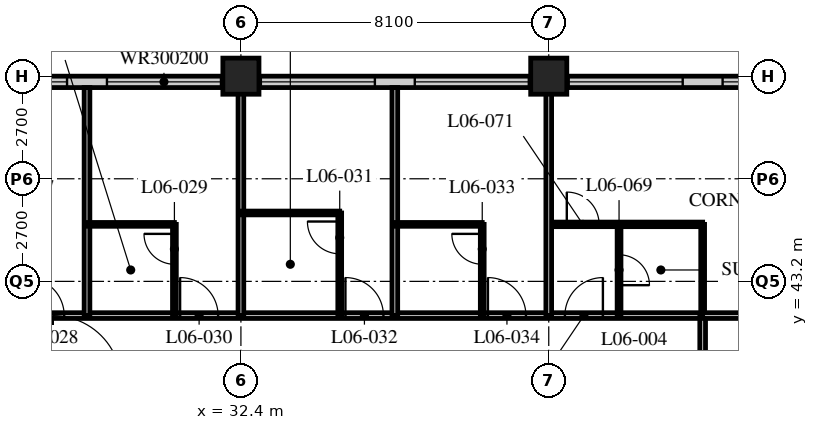
"""IFC4 building model, lengths in metres.
Left out: names, types, materials, properties, quantities, classifications, styles, units other than length and angle.
Written with IfcOpenShell. Run it as: python <this file> out.ifc"""

import sys

from ifc_helpers import new_model, si_unit, direction, frame, frame_2d, origin, origin_2d, place, context, subcontext, project, spatial, rectangle, hollow_rectangle, extrude, element, fill, save


model = new_model("IFC4")
c1 = context("Model", 3, precision=1e-05, world=origin(), true_north=direction((0.0, 1.0)))
c2 = subcontext(c1, "Body", "Model", "MODEL_VIEW")
j1 = project(units=[si_unit("LENGTHUNIT", "METRE"), si_unit("PLANEANGLEUNIT", "RADIAN")], contexts=[c1])
p1 = place(None, origin())
s1 = spatial("IfcSite", under=j1, at=p1, CompositionType="ELEMENT")
p2 = place(p1, origin())
s2 = spatial("IfcBuilding", under=s1, at=p2, CompositionType="ELEMENT")
p3 = place(p2, frame((0.0, 0.0, 33.0)))
s3 = spatial("IfcBuildingStorey", under=s2, at=p3, CompositionType="ELEMENT", Elevation=33.0)
for number, where, z_axis, x_axis in (
    (1, (32.4, 48.6, 0.0), (0.0, 0.0, 1.0), (1.0, 0.0, 0.0)),
    (2, (40.5, 48.6, 0.0), (0.0, 0.0, 1.0), (1.0, 0.0, 0.0)),
):
    element("IfcColumn", number, at=place(p3, frame(where, z_axis=z_axis, x_axis=x_axis)), inside=s3, PredefinedType="COLUMN", context=c2, shape_type="SweptSolid", body=[
        extrude(hollow_rectangle(XDim=0.95, YDim=0.95, WallThickness=0.095, at=origin_2d()), origin(), (0.0, 0.0, 1.0), 3.4),
    ])
p4 = place(p3, frame((48.3, 48.45, 0.0), z_axis=(0.0, 0.0, 1.0), x_axis=(-1.0, 0.0, 0.0)))
e3 = element("IfcWall", 3, at=p4, inside=s3, PredefinedType="SOLIDWALL", context=c2, shape_type="SweptSolid", body=[
    extrude(rectangle(XDim=40.2, YDim=0.3, at=frame_2d((20.1, 0.0))), origin(), (0.0, 0.0, 1.0), 3.19),
])
p5 = place(p4, frame((0.225, 0.0, 0.9)))
e4 = element("IfcOpeningElement", 4, at=p5, cuts=e3, PredefinedType="OPENING", context=c2, shape_type="SweptSolid", body=[
    extrude(rectangle(XDim=3.0, YDim=2.0, at=frame_2d((1.5, 1.0))), frame((0.0, 0.16, 0.0), z_axis=(0.0, -1.0, 0.0), x_axis=(1.0, 0.0, 0.0)), (0.0, 0.0, 1.0), 0.32),
])
p6 = place(p4, frame((4.275, 0.0, 0.9)))
e5 = element("IfcOpeningElement", 5, at=p6, cuts=e3, PredefinedType="OPENING", context=c2, shape_type="SweptSolid", body=[
    extrude(rectangle(XDim=3.0, YDim=2.0, at=frame_2d((1.5, 1.0))), frame((0.0, 0.16, 0.0), z_axis=(0.0, -1.0, 0.0), x_axis=(1.0, 0.0, 0.0)), (0.0, 0.0, 1.0), 0.32),
])
p7 = place(p4, frame((8.325, 0.0, 0.9)))
e6 = element("IfcOpeningElement", 6, at=p7, cuts=e3, PredefinedType="OPENING", context=c2, shape_type="SweptSolid", body=[
    extrude(rectangle(XDim=3.0, YDim=2.0, at=frame_2d((1.5, 1.0))), frame((0.0, 0.16, 0.0), z_axis=(0.0, -1.0, 0.0), x_axis=(1.0, 0.0, 0.0)), (0.0, 0.0, 1.0), 0.32),
])
p8 = place(p4, frame((12.375, 0.0, 0.9)))
e7 = element("IfcOpeningElement", 7, at=p8, cuts=e3, PredefinedType="OPENING", context=c2, shape_type="SweptSolid", body=[
    extrude(rectangle(XDim=3.0, YDim=2.0, at=frame_2d((1.5, 1.0))), frame((0.0, 0.16, 0.0), z_axis=(0.0, -1.0, 0.0), x_axis=(1.0, 0.0, 0.0)), (0.0, 0.0, 1.0), 0.32),
])
p9 = place(p4, frame((16.425, 0.0, 0.9)))
e8 = element("IfcOpeningElement", 8, at=p9, cuts=e3, PredefinedType="OPENING", context=c2, shape_type="SweptSolid", body=[
    extrude(rectangle(XDim=3.0, YDim=2.0, at=frame_2d((1.5, 1.0))), frame((0.0, 0.16, 0.0), z_axis=(0.0, -1.0, 0.0), x_axis=(1.0, 0.0, 0.0)), (0.0, 0.0, 1.0), 0.32),
])
p10 = place(p4, frame((20.475, 0.0, 0.9)))
e9 = element("IfcOpeningElement", 9, at=p10, cuts=e3, PredefinedType="OPENING", context=c2, shape_type="SweptSolid", body=[
    extrude(rectangle(XDim=3.0, YDim=2.0, at=frame_2d((1.5, 1.0))), frame((0.0, 0.16, 0.0), z_axis=(0.0, -1.0, 0.0), x_axis=(1.0, 0.0, 0.0)), (0.0, 0.0, 1.0), 0.32),
])
p11 = place(p4, frame((24.525, 0.0, 0.9)))
e10 = element("IfcOpeningElement", 10, at=p11, cuts=e3, PredefinedType="OPENING", context=c2, shape_type="SweptSolid", body=[
    extrude(rectangle(XDim=3.0, YDim=2.0, at=frame_2d((1.5, 1.0))), frame((0.0, 0.16, 0.0), z_axis=(0.0, -1.0, 0.0), x_axis=(1.0, 0.0, 0.0)), (0.0, 0.0, 1.0), 0.32),
])
p12 = place(p4, frame((28.575, 0.0, 0.9)))
e11 = element("IfcOpeningElement", 11, at=p12, cuts=e3, PredefinedType="OPENING", context=c2, shape_type="SweptSolid", body=[
    extrude(rectangle(XDim=3.0, YDim=2.0, at=frame_2d((1.5, 1.0))), frame((0.0, 0.16, 0.0), z_axis=(0.0, -1.0, 0.0), x_axis=(1.0, 0.0, 0.0)), (0.0, 0.0, 1.0), 0.32),
])
p13 = place(p4, frame((32.625, 0.0, 0.9)))
e12 = element("IfcOpeningElement", 12, at=p13, cuts=e3, PredefinedType="OPENING", context=c2, shape_type="SweptSolid", body=[
    extrude(rectangle(XDim=3.0, YDim=2.0, at=frame_2d((1.5, 1.0))), frame((0.0, 0.16, 0.0), z_axis=(0.0, -1.0, 0.0), x_axis=(1.0, 0.0, 0.0)), (0.0, 0.0, 1.0), 0.32),
])
p14 = place(p4, frame((36.675, 0.0, 0.9)))
e13 = element("IfcOpeningElement", 13, at=p14, cuts=e3, PredefinedType="OPENING", context=c2, shape_type="SweptSolid", body=[
    extrude(rectangle(XDim=3.0, YDim=2.0, at=frame_2d((1.5, 1.0))), frame((0.0, 0.16, 0.0), z_axis=(0.0, -1.0, 0.0), x_axis=(1.0, 0.0, 0.0)), (0.0, 0.0, 1.0), 0.32),
])
p15 = place(p3, frame((12.15, 42.3, 0.0), z_axis=(0.0, 0.0, 1.0), x_axis=(1.0, 0.0, 0.0)))
e14 = element("IfcWall", 14, at=p15, inside=s3, PredefinedType="PARTITIONING", context=c2, shape_type="SweptSolid", body=[
    extrude(rectangle(XDim=32.4, YDim=0.15, at=frame_2d((16.2, 0.0))), origin(), (0.0, 0.0, 1.0), 3.19),
])
p16 = place(p15, frame((6.5, 0.0, 0.0)))
e15 = element("IfcOpeningElement", 15, at=p16, cuts=e14, PredefinedType="OPENING", context=c2, shape_type="SweptSolid", body=[
    extrude(rectangle(XDim=1.0, YDim=2.1, at=frame_2d((0.5, 1.05))), frame((0.0, 0.085, 0.0), z_axis=(0.0, -1.0, 0.0), x_axis=(1.0, 0.0, 0.0)), (0.0, 0.0, 1.0), 0.17),
])
p17 = place(p15, frame((8.4, 0.0, 0.0)))
e16 = element("IfcOpeningElement", 16, at=p17, cuts=e14, PredefinedType="OPENING", context=c2, shape_type="SweptSolid", body=[
    extrude(rectangle(XDim=1.0, YDim=2.1, at=frame_2d((0.5, 1.05))), frame((0.0, 0.085, 0.0), z_axis=(0.0, -1.0, 0.0), x_axis=(1.0, 0.0, 0.0)), (0.0, 0.0, 1.0), 0.17),
])
p18 = place(p15, frame((14.6, 0.0, 0.0)))
e17 = element("IfcOpeningElement", 17, at=p18, cuts=e14, PredefinedType="OPENING", context=c2, shape_type="SweptSolid", body=[
    extrude(rectangle(XDim=1.0, YDim=2.1, at=frame_2d((0.5, 1.05))), frame((0.0, 0.085, 0.0), z_axis=(0.0, -1.0, 0.0), x_axis=(1.0, 0.0, 0.0)), (0.0, 0.0, 1.0), 0.17),
])
p19 = place(p15, frame((18.65, 0.0, 0.0)))
e18 = element("IfcOpeningElement", 18, at=p19, cuts=e14, PredefinedType="OPENING", context=c2, shape_type="SweptSolid", body=[
    extrude(rectangle(XDim=1.0, YDim=2.1, at=frame_2d((0.5, 1.05))), frame((0.0, 0.085, 0.0), z_axis=(0.0, -1.0, 0.0), x_axis=(1.0, 0.0, 0.0)), (0.0, 0.0, 1.0), 0.17),
])
p20 = place(p15, frame((23.0, 0.0, 0.0)))
e19 = element("IfcOpeningElement", 19, at=p20, cuts=e14, PredefinedType="OPENING", context=c2, shape_type="SweptSolid", body=[
    extrude(rectangle(XDim=1.0, YDim=2.1, at=frame_2d((0.5, 1.05))), frame((0.0, 0.085, 0.0), z_axis=(0.0, -1.0, 0.0), x_axis=(1.0, 0.0, 0.0)), (0.0, 0.0, 1.0), 0.17),
])
p21 = place(p15, frame((26.75, 0.0, 0.0)))
e20 = element("IfcOpeningElement", 20, at=p21, cuts=e14, PredefinedType="OPENING", context=c2, shape_type="SweptSolid", body=[
    extrude(rectangle(XDim=1.0, YDim=2.1, at=frame_2d((0.5, 1.05))), frame((0.0, 0.085, 0.0), z_axis=(0.0, -1.0, 0.0), x_axis=(1.0, 0.0, 0.0)), (0.0, 0.0, 1.0), 0.17),
])
p22 = place(p15, frame((28.775, 0.0, 0.0)))
e21 = element("IfcOpeningElement", 21, at=p22, cuts=e14, PredefinedType="OPENING", context=c2, shape_type="SweptSolid", body=[
    extrude(rectangle(XDim=1.0, YDim=2.1, at=frame_2d((0.5, 1.05))), frame((0.0, 0.085, 0.0), z_axis=(0.0, -1.0, 0.0), x_axis=(1.0, 0.0, 0.0)), (0.0, 0.0, 1.0), 0.17),
])
p23 = place(p15, frame((2.625, 0.0, 0.0)))
e22 = element("IfcOpeningElement", 22, at=p23, cuts=e14, PredefinedType="OPENING", context=c2, shape_type="SweptSolid", body=[
    extrude(rectangle(XDim=1.0, YDim=2.1, at=frame_2d((0.5, 1.05))), frame((0.0, 0.085, 0.0), z_axis=(0.0, -1.0, 0.0), x_axis=(1.0, 0.0, 0.0)), (0.0, 0.0, 1.0), 0.17),
])
p24 = place(p3, frame((44.55, 16.2, 0.0), z_axis=(0.0, 0.0, 1.0), x_axis=(0.0, 1.0, 0.0)))
e23 = element("IfcWall", 23, at=p24, inside=s3, PredefinedType="PARTITIONING", context=c2, shape_type="SweptSolid", body=[
    extrude(rectangle(XDim=26.1, YDim=0.15, at=frame_2d((13.05, 0.0))), origin(), (0.0, 0.0, 1.0), 3.19),
])
p25 = place(p24, frame((2.75, 0.0, 0.0)))
e24 = element("IfcOpeningElement", 24, at=p25, cuts=e23, PredefinedType="OPENING", context=c2, shape_type="SweptSolid", body=[
    extrude(rectangle(XDim=1.0, YDim=2.1, at=frame_2d((0.5, 1.05))), frame((0.0, 0.085, 0.0), z_axis=(0.0, -1.0, 0.0), x_axis=(1.0, 0.0, 0.0)), (0.0, 0.0, 1.0), 0.17),
])
p26 = place(p24, frame((4.35, 0.0, 0.0)))
e25 = element("IfcOpeningElement", 25, at=p26, cuts=e23, PredefinedType="OPENING", context=c2, shape_type="SweptSolid", body=[
    extrude(rectangle(XDim=1.0, YDim=2.1, at=frame_2d((0.5, 1.05))), frame((0.0, 0.085, 0.0), z_axis=(0.0, -1.0, 0.0), x_axis=(1.0, 0.0, 0.0)), (0.0, 0.0, 1.0), 0.17),
])
p27 = place(p24, frame((8.4, 0.0, 0.0)))
e26 = element("IfcOpeningElement", 26, at=p27, cuts=e23, PredefinedType="OPENING", context=c2, shape_type="SweptSolid", body=[
    extrude(rectangle(XDim=1.0, YDim=2.1, at=frame_2d((0.5, 1.05))), frame((0.0, 0.085, 0.0), z_axis=(0.0, -1.0, 0.0), x_axis=(1.0, 0.0, 0.0)), (0.0, 0.0, 1.0), 0.17),
])
p28 = place(p24, frame((14.6, 0.0, 0.0)))
e27 = element("IfcOpeningElement", 27, at=p28, cuts=e23, PredefinedType="OPENING", context=c2, shape_type="SweptSolid", body=[
    extrude(rectangle(XDim=1.0, YDim=2.1, at=frame_2d((0.5, 1.05))), frame((0.0, 0.085, 0.0), z_axis=(0.0, -1.0, 0.0), x_axis=(1.0, 0.0, 0.0)), (0.0, 0.0, 1.0), 0.17),
])
p29 = place(p24, frame((18.65, 0.0, 0.0)))
e28 = element("IfcOpeningElement", 28, at=p29, cuts=e23, PredefinedType="OPENING", context=c2, shape_type="SweptSolid", body=[
    extrude(rectangle(XDim=1.0, YDim=2.1, at=frame_2d((0.5, 1.05))), frame((0.0, 0.085, 0.0), z_axis=(0.0, -1.0, 0.0), x_axis=(1.0, 0.0, 0.0)), (0.0, 0.0, 1.0), 0.17),
])
p30 = place(p24, frame((22.65, 0.0, 0.0)))
e29 = element("IfcOpeningElement", 29, at=p30, cuts=e23, PredefinedType="OPENING", context=c2, shape_type="SweptSolid", body=[
    extrude(rectangle(XDim=1.0, YDim=2.1, at=frame_2d((0.5, 1.05))), frame((0.0, 0.085, 0.0), z_axis=(0.0, -1.0, 0.0), x_axis=(1.0, 0.0, 0.0)), (0.0, 0.0, 1.0), 0.17),
])
p31 = place(p3, frame((28.35, 42.3, 0.0), z_axis=(0.0, 0.0, 1.0), x_axis=(0.0, 1.0, 0.0)))
e30 = element("IfcWall", 30, at=p31, inside=s3, PredefinedType="PARTITIONING", context=c2, shape_type="SweptSolid", body=[
    extrude(rectangle(XDim=6.0, YDim=0.15, at=frame_2d((3.0, 0.0))), origin(), (0.0, 0.0, 1.0), 3.19),
])
p32 = place(p3, frame((28.35, 44.7, 0.0), z_axis=(0.0, 0.0, 1.0), x_axis=(1.0, 0.0, 0.0)))
e31 = element("IfcWall", 31, at=p32, inside=s3, PredefinedType="PARTITIONING", context=c2, shape_type="SweptSolid", body=[
    extrude(rectangle(XDim=2.3, YDim=0.1, at=frame_2d((1.15, 0.0))), origin(), (0.0, 0.0, 1.0), 3.19),
])
p33 = place(p3, frame((30.65, 42.3, 0.0), z_axis=(0.0, 0.0, 1.0), x_axis=(0.0, 1.0, 0.0)))
e32 = element("IfcWall", 32, at=p33, inside=s3, PredefinedType="PARTITIONING", context=c2, shape_type="SweptSolid", body=[
    extrude(rectangle(XDim=2.4, YDim=0.1, at=frame_2d((1.2, 0.0))), origin(), (0.0, 0.0, 1.0), 3.19),
])
p34 = place(p33, frame((1.35, 0.0, 0.0)))
e33 = element("IfcOpeningElement", 33, at=p34, cuts=e32, PredefinedType="OPENING", context=c2, shape_type="SweptSolid", body=[
    extrude(rectangle(XDim=0.8, YDim=2.1, at=frame_2d((0.4, 1.05))), frame((0.0, 0.06, 0.0), z_axis=(0.0, -1.0, 0.0), x_axis=(1.0, 0.0, 0.0)), (0.0, 0.0, 1.0), 0.12),
])
p35 = place(p3, frame((32.4, 42.3, 0.0), z_axis=(0.0, 0.0, 1.0), x_axis=(0.0, 1.0, 0.0)))
e34 = element("IfcWall", 34, at=p35, inside=s3, PredefinedType="PARTITIONING", context=c2, shape_type="SweptSolid", body=[
    extrude(rectangle(XDim=6.0, YDim=0.15, at=frame_2d((3.0, 0.0))), origin(), (0.0, 0.0, 1.0), 2.578),
])
p36 = place(p3, frame((32.4, 45.0, 0.0), z_axis=(0.0, 0.0, 1.0), x_axis=(1.0, 0.0, 0.0)))
e35 = element("IfcWall", 35, at=p36, inside=s3, PredefinedType="PARTITIONING", context=c2, shape_type="SweptSolid", body=[
    extrude(rectangle(XDim=2.6, YDim=0.1, at=frame_2d((1.3, 0.0))), origin(), (0.0, 0.0, 1.0), 3.19),
])
p37 = place(p3, frame((35.0, 42.3, 0.0), z_axis=(0.0, 0.0, 1.0), x_axis=(0.0, 1.0, 0.0)))
e36 = element("IfcWall", 36, at=p37, inside=s3, PredefinedType="PARTITIONING", context=c2, shape_type="SweptSolid", body=[
    extrude(rectangle(XDim=2.7, YDim=0.1, at=frame_2d((1.35, 0.0))), origin(), (0.0, 0.0, 1.0), 3.19),
])
p38 = place(p37, frame((1.625, 0.0, 0.0)))
e37 = element("IfcOpeningElement", 37, at=p38, cuts=e36, PredefinedType="OPENING", context=c2, shape_type="SweptSolid", body=[
    extrude(rectangle(XDim=0.85, YDim=2.1, at=frame_2d((0.425, 1.05))), frame((0.0, 0.06, 0.0), z_axis=(0.0, -1.0, 0.0), x_axis=(1.0, 0.0, 0.0)), (0.0, 0.0, 1.0), 0.12),
])
p39 = place(p3, frame((36.45, 42.3, 0.0), z_axis=(0.0, 0.0, 1.0), x_axis=(0.0, 1.0, 0.0)))
e38 = element("IfcWall", 38, at=p39, inside=s3, PredefinedType="PARTITIONING", context=c2, shape_type="SweptSolid", body=[
    extrude(rectangle(XDim=6.0, YDim=0.15, at=frame_2d((3.0, 0.0))), origin(), (0.0, 0.0, 1.0), 3.19),
])
p40 = place(p3, frame((36.45, 44.7, 0.0), z_axis=(0.0, 0.0, 1.0), x_axis=(1.0, 0.0, 0.0)))
e39 = element("IfcWall", 39, at=p40, inside=s3, PredefinedType="PARTITIONING", context=c2, shape_type="SweptSolid", body=[
    extrude(rectangle(XDim=2.3, YDim=0.1, at=frame_2d((1.15, 0.0))), origin(), (0.0, 0.0, 1.0), 3.19),
])
p41 = place(p3, frame((38.75, 42.3, 0.0), z_axis=(0.0, 0.0, 1.0), x_axis=(0.0, 1.0, 0.0)))
e40 = element("IfcWall", 40, at=p41, inside=s3, PredefinedType="PARTITIONING", context=c2, shape_type="SweptSolid", body=[
    extrude(rectangle(XDim=2.4, YDim=0.1, at=frame_2d((1.2, 0.0))), origin(), (0.0, 0.0, 1.0), 3.19),
])
p42 = place(p41, frame((1.35, 0.0, 0.0)))
e41 = element("IfcOpeningElement", 41, at=p42, cuts=e40, PredefinedType="OPENING", context=c2, shape_type="SweptSolid", body=[
    extrude(rectangle(XDim=0.8, YDim=2.1, at=frame_2d((0.4, 1.05))), frame((0.0, 0.06, 0.0), z_axis=(0.0, -1.0, 0.0), x_axis=(1.0, 0.0, 0.0)), (0.0, 0.0, 1.0), 0.12),
])
p43 = place(p3, frame((40.5, 44.7, 0.0), z_axis=(0.0, 0.0, 1.0), x_axis=(1.0, 0.0, 0.0)))
e42 = element("IfcWall", 42, at=p43, inside=s3, PredefinedType="PARTITIONING", context=c2, shape_type="SweptSolid", body=[
    extrude(rectangle(XDim=4.05, YDim=0.12, at=frame_2d((2.025, 0.0))), origin(), (0.0, 0.0, 1.0), 3.19),
])
p44 = place(p43, frame((0.475, 0.0, 0.0)))
e43 = element("IfcOpeningElement", 43, at=p44, cuts=e42, PredefinedType="OPENING", context=c2, shape_type="SweptSolid", body=[
    extrude(rectangle(XDim=0.85, YDim=2.1, at=frame_2d((0.425, 1.05))), frame((0.0, 0.07, 0.0), z_axis=(0.0, -1.0, 0.0), x_axis=(1.0, 0.0, 0.0)), (0.0, 0.0, 1.0), 0.14),
])
p45 = place(p3, frame((42.35, 42.3, 0.0), z_axis=(0.0, 0.0, 1.0), x_axis=(0.0, 1.0, 0.0)))
e44 = element("IfcWall", 44, at=p45, inside=s3, PredefinedType="PARTITIONING", context=c2, shape_type="SweptSolid", body=[
    extrude(rectangle(XDim=2.4, YDim=0.1, at=frame_2d((1.2, 0.0))), origin(), (0.0, 0.0, 1.0), 3.19),
])
p46 = place(p45, frame((0.8, 0.0, 0.0)))
e45 = element("IfcOpeningElement", 45, at=p46, cuts=e44, PredefinedType="OPENING", context=c2, shape_type="SweptSolid", body=[
    extrude(rectangle(XDim=0.8, YDim=2.1, at=frame_2d((0.4, 1.05))), frame((0.0, 0.06, 0.0), z_axis=(0.0, -1.0, 0.0), x_axis=(1.0, 0.0, 0.0)), (0.0, 0.0, 1.0), 0.12),
])
p47 = place(p3, frame((44.55, 42.3, 0.0), z_axis=(0.0, 0.0, 1.0), x_axis=(0.0, 1.0, 0.0)))
e46 = element("IfcWall", 46, at=p47, inside=s3, PredefinedType="PARTITIONING", context=c2, shape_type="SweptSolid", body=[
    extrude(rectangle(XDim=2.4, YDim=0.1, at=frame_2d((1.2, 0.0))), origin(), (0.0, 0.0, 1.0), 3.19),
])
p48 = place(p3, frame((44.55, 42.3, 0.0), z_axis=(0.0, 0.0, 1.0), x_axis=(1.0, 0.0, 0.0)))
e47 = element("IfcWall", 47, at=p48, inside=s3, PredefinedType="PARTITIONING", context=c2, shape_type="SweptSolid", body=[
    extrude(rectangle(XDim=7.8, YDim=0.15, at=frame_2d((3.9, 0.0))), origin(), (0.0, 0.0, 1.0), 3.19),
])
p49 = place(p3, frame((40.5, 42.3, 0.0), z_axis=(0.0, 0.0, 1.0), x_axis=(0.0, 1.0, 0.0)))
e48 = element("IfcWall", 48, at=p49, inside=s3, PredefinedType="PARTITIONING", context=c2, shape_type="SweptSolid", body=[
    extrude(rectangle(XDim=6.0, YDim=0.15, at=frame_2d((3.0, 0.0))), origin(), (0.0, 0.0, 1.0), 2.578),
])
p50 = place(p5, origin())
e49 = element("IfcWindow", 49, at=p50, inside=s3, PartitioningType="SINGLE_PANEL", PredefinedType="WINDOW", context=c2, shape_type="SweptSolid", body=[
    extrude(rectangle(XDim=3.0, YDim=2.0, at=frame_2d((1.5, 1.0))), frame((0.0, 0.03, 0.0), z_axis=(0.0, -1.0, 0.0), x_axis=(1.0, 0.0, 0.0)), (0.0, 0.0, 1.0), 0.06),
])
fill(e4, e49)
p51 = place(p6, origin())
e50 = element("IfcWindow", 50, at=p51, inside=s3, PartitioningType="SINGLE_PANEL", PredefinedType="WINDOW", context=c2, shape_type="SweptSolid", body=[
    extrude(rectangle(XDim=3.0, YDim=2.0, at=frame_2d((1.5, 1.0))), frame((0.0, 0.03, 0.0), z_axis=(0.0, -1.0, 0.0), x_axis=(1.0, 0.0, 0.0)), (0.0, 0.0, 1.0), 0.06),
])
fill(e5, e50)
p52 = place(p7, origin())
e51 = element("IfcWindow", 51, at=p52, inside=s3, PartitioningType="SINGLE_PANEL", PredefinedType="WINDOW", context=c2, shape_type="SweptSolid", body=[
    extrude(rectangle(XDim=3.0, YDim=2.0, at=frame_2d((1.5, 1.0))), frame((0.0, 0.03, 0.0), z_axis=(0.0, -1.0, 0.0), x_axis=(1.0, 0.0, 0.0)), (0.0, 0.0, 1.0), 0.06),
])
fill(e6, e51)
p53 = place(p8, origin())
e52 = element("IfcWindow", 52, at=p53, inside=s3, PartitioningType="SINGLE_PANEL", PredefinedType="WINDOW", context=c2, shape_type="SweptSolid", body=[
    extrude(rectangle(XDim=3.0, YDim=2.0, at=frame_2d((1.5, 1.0))), frame((0.0, 0.03, 0.0), z_axis=(0.0, -1.0, 0.0), x_axis=(1.0, 0.0, 0.0)), (0.0, 0.0, 1.0), 0.06),
])
fill(e7, e52)
p54 = place(p9, origin())
e53 = element("IfcWindow", 53, at=p54, inside=s3, PartitioningType="SINGLE_PANEL", PredefinedType="WINDOW", context=c2, shape_type="SweptSolid", body=[
    extrude(rectangle(XDim=3.0, YDim=2.0, at=frame_2d((1.5, 1.0))), frame((0.0, 0.03, 0.0), z_axis=(0.0, -1.0, 0.0), x_axis=(1.0, 0.0, 0.0)), (0.0, 0.0, 1.0), 0.06),
])
fill(e8, e53)
p55 = place(p10, origin())
e54 = element("IfcWindow", 54, at=p55, inside=s3, PartitioningType="SINGLE_PANEL", PredefinedType="WINDOW", context=c2, shape_type="SweptSolid", body=[
    extrude(rectangle(XDim=3.0, YDim=2.0, at=frame_2d((1.5, 1.0))), frame((0.0, 0.03, 0.0), z_axis=(0.0, -1.0, 0.0), x_axis=(1.0, 0.0, 0.0)), (0.0, 0.0, 1.0), 0.06),
])
fill(e9, e54)
p56 = place(p18, origin())
e55 = element("IfcDoor", 55, at=p56, inside=s3, OperationType="SINGLE_SWING_LEFT", PredefinedType="DOOR", context=c2, shape_type="SweptSolid", body=[
    extrude(rectangle(XDim=1.0, YDim=2.1, at=frame_2d((0.5, 1.05))), frame((0.0, 0.025, 0.0), z_axis=(0.0, -1.0, 0.0), x_axis=(1.0, 0.0, 0.0)), (0.0, 0.0, 1.0), 0.05),
])
fill(e17, e55)
p57 = place(p34, origin())
e56 = element("IfcDoor", 56, at=p57, inside=s3, OperationType="SINGLE_SWING_RIGHT", PredefinedType="DOOR", context=c2, shape_type="SweptSolid", body=[
    extrude(rectangle(XDim=0.8, YDim=2.1, at=frame_2d((0.4, 1.05))), frame((0.0, 0.025, 0.0), z_axis=(0.0, -1.0, 0.0), x_axis=(1.0, 0.0, 0.0)), (0.0, 0.0, 1.0), 0.05),
])
fill(e33, e56)
p58 = place(p19, origin())
e57 = element("IfcDoor", 57, at=p58, inside=s3, OperationType="SINGLE_SWING_LEFT", PredefinedType="DOOR", context=c2, shape_type="SweptSolid", body=[
    extrude(rectangle(XDim=1.0, YDim=2.1, at=frame_2d((0.5, 1.05))), frame((0.0, 0.025, 0.0), z_axis=(0.0, -1.0, 0.0), x_axis=(1.0, 0.0, 0.0)), (0.0, 0.0, 1.0), 0.05),
])
fill(e18, e57)
p59 = place(p38, origin())
e58 = element("IfcDoor", 58, at=p59, inside=s3, OperationType="SINGLE_SWING_RIGHT", PredefinedType="DOOR", context=c2, shape_type="SweptSolid", body=[
    extrude(rectangle(XDim=0.85, YDim=2.1, at=frame_2d((0.425, 1.05))), frame((0.0, 0.025, 0.0), z_axis=(0.0, -1.0, 0.0), x_axis=(1.0, 0.0, 0.0)), (0.0, 0.0, 1.0), 0.05),
])
fill(e37, e58)
p60 = place(p20, origin())
e59 = element("IfcDoor", 59, at=p60, inside=s3, OperationType="SINGLE_SWING_LEFT", PredefinedType="DOOR", context=c2, shape_type="SweptSolid", body=[
    extrude(rectangle(XDim=1.0, YDim=2.1, at=frame_2d((0.5, 1.05))), frame((0.0, 0.025, 0.0), z_axis=(0.0, -1.0, 0.0), x_axis=(1.0, 0.0, 0.0)), (0.0, 0.0, 1.0), 0.05),
])
fill(e19, e59)
p61 = place(p42, origin())
e60 = element("IfcDoor", 60, at=p61, inside=s3, OperationType="SINGLE_SWING_RIGHT", PredefinedType="DOOR", context=c2, shape_type="SweptSolid", body=[
    extrude(rectangle(XDim=0.8, YDim=2.1, at=frame_2d((0.4, 1.05))), frame((0.0, 0.025, 0.0), z_axis=(0.0, -1.0, 0.0), x_axis=(1.0, 0.0, 0.0)), (0.0, 0.0, 1.0), 0.05),
])
fill(e41, e60)
p62 = place(p21, origin())
e61 = element("IfcDoor", 61, at=p62, inside=s3, OperationType="SINGLE_SWING_LEFT", PredefinedType="DOOR", context=c2, shape_type="SweptSolid", body=[
    extrude(rectangle(XDim=1.0, YDim=2.1, at=frame_2d((0.5, 1.05))), frame((0.0, 0.025, 0.0), z_axis=(0.0, -1.0, 0.0), x_axis=(1.0, 0.0, 0.0)), (0.0, 0.0, 1.0), 0.05),
])
fill(e20, e61)
p63 = place(p46, origin())
e62 = element("IfcDoor", 62, at=p63, inside=s3, OperationType="SINGLE_SWING_RIGHT", PredefinedType="DOOR", context=c2, shape_type="SweptSolid", body=[
    extrude(rectangle(XDim=0.8, YDim=2.1, at=frame_2d((0.4, 1.05))), frame((0.0, 0.025, 0.0), z_axis=(0.0, -1.0, 0.0), x_axis=(1.0, 0.0, 0.0)), (0.0, 0.0, 1.0), 0.05),
])
fill(e45, e62)
p64 = place(p22, origin())
e63 = element("IfcDoor", 63, at=p64, inside=s3, OperationType="SINGLE_SWING_RIGHT", PredefinedType="DOOR", context=c2, shape_type="SweptSolid", body=[
    extrude(rectangle(XDim=1.0, YDim=2.1, at=frame_2d((0.5, 1.05))), frame((0.0, 0.025, 0.0), z_axis=(0.0, -1.0, 0.0), x_axis=(1.0, 0.0, 0.0)), (0.0, 0.0, 1.0), 0.05),
])
fill(e21, e63)
p65 = place(p44, origin())
e64 = element("IfcDoor", 64, at=p65, inside=s3, OperationType="SINGLE_SWING_LEFT", PredefinedType="DOOR", context=c2, shape_type="SweptSolid", body=[
    extrude(rectangle(XDim=0.85, YDim=2.1, at=frame_2d((0.425, 1.05))), frame((0.0, 0.025, 0.0), z_axis=(0.0, -1.0, 0.0), x_axis=(1.0, 0.0, 0.0)), (0.0, 0.0, 1.0), 0.05),
])
fill(e43, e64)
save(model, sys.argv[1])
